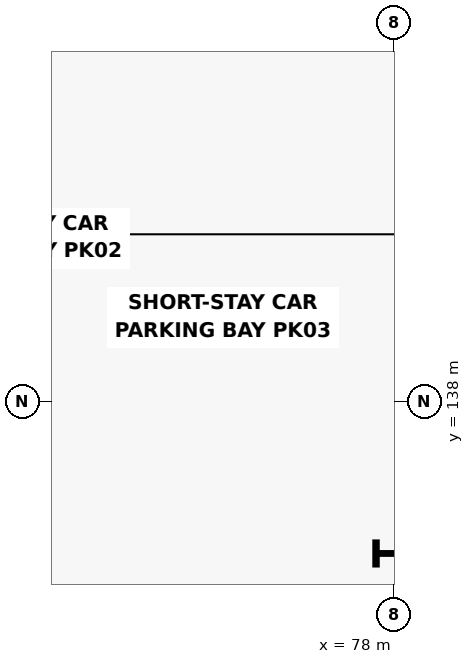
"""IFC4 building model, lengths in metres.
Left out: names, types, materials, properties, quantities, classifications, styles, units other than length and angle.
Written with IfcOpenShell. Run it as: python <this file> out.ifc"""

import sys

from ifc_helpers import new_model, si_unit, direction, frame, origin, origin_2d, place, context, subcontext, project, spatial, i_section, extrude, element, save


model = new_model("IFC4")
c1 = context("Model", 3, precision=1e-05, world=origin(), true_north=direction((0.0, 1.0)))
c2 = subcontext(c1, "Body", "Model", "MODEL_VIEW")
j1 = project(units=[si_unit("LENGTHUNIT", "METRE"), si_unit("PLANEANGLEUNIT", "RADIAN")], contexts=[c1])
p1 = place(None, origin())
s1 = spatial("IfcSite", under=j1, at=p1, CompositionType="ELEMENT")
p2 = place(p1, origin())
s2 = spatial("IfcBuilding", under=s1, at=p2, CompositionType="ELEMENT")
p3 = place(p2, origin())
s3 = spatial("IfcBuildingStorey", under=s2, at=p3, CompositionType="ELEMENT", Elevation=0.0)
p4 = place(p3, frame((78.0, 136.0, 0.0), z_axis=(0.0, 0.0, 1.0), x_axis=(1.0, 0.0, 0.0)))
e1 = element("IfcColumn", 1, at=p4, inside=s3, PredefinedType="COLUMN", context=c2, shape_type="SweptSolid", body=[
    extrude(i_section(OverallWidth=0.3, OverallDepth=0.5, WebThickness=0.014, FlangeThickness=0.028, FilletRadius=0.027, at=origin_2d()), origin(), (0.0, 0.0, 1.0), 5.4),
])
save(model, sys.argv[1])
